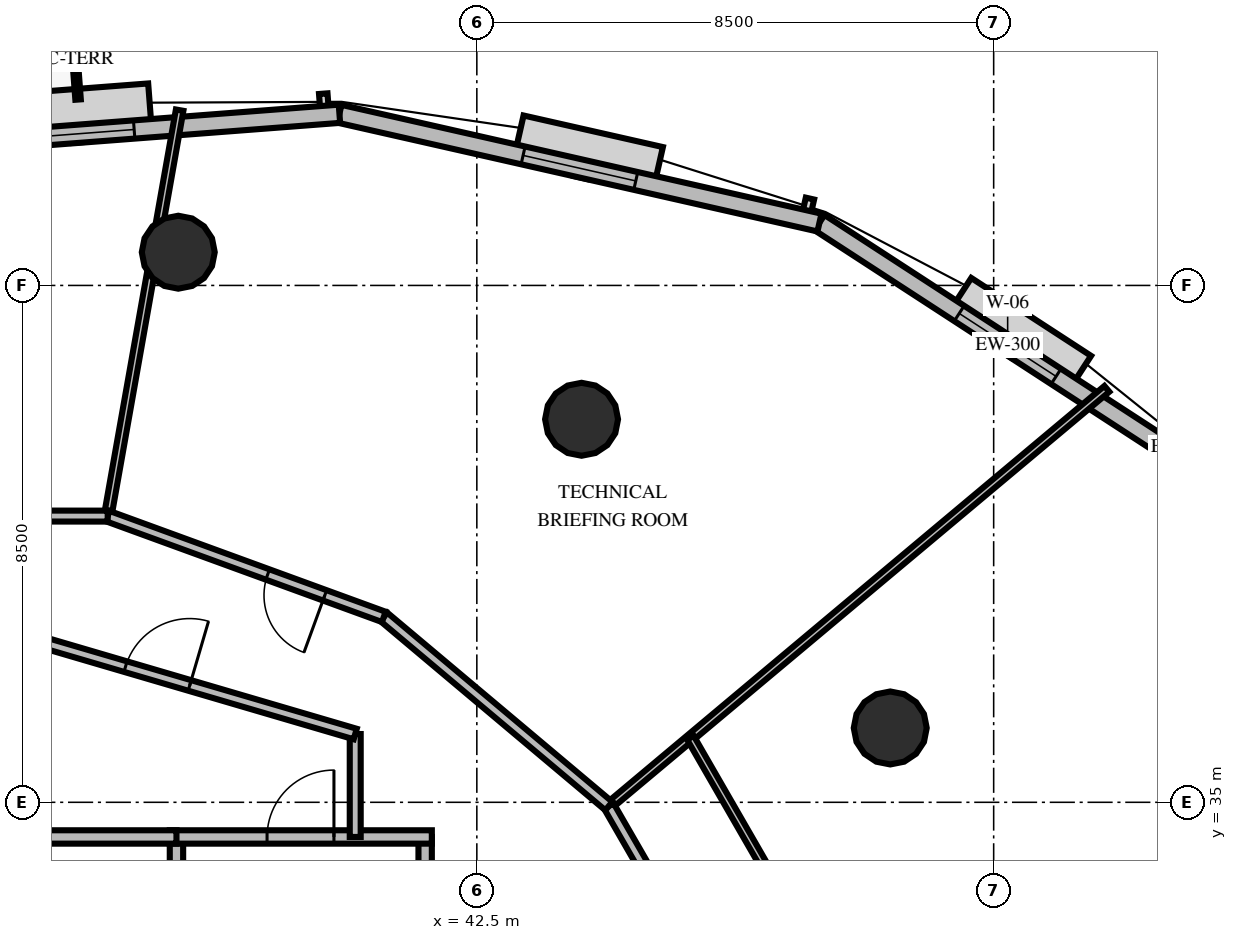
"""IFC4 building model, lengths in metres.
Left out: names, types, materials, properties, quantities, classifications, styles, units other than length and angle.
Written with IfcOpenShell. Run it as: python <this file> out.ifc"""

import sys

from ifc_helpers import new_model, si_unit, direction, frame, frame_2d, origin, origin_2d, place, context, subcontext, project, spatial, rectangle, circle, extrude, element, fill, save


model = new_model("IFC4")
c1 = context("Model", 3, precision=1e-05, world=origin(), true_north=direction((0.0, 1.0)))
c2 = subcontext(c1, "Body", "Model", "MODEL_VIEW")
j1 = project(units=[si_unit("LENGTHUNIT", "METRE"), si_unit("PLANEANGLEUNIT", "RADIAN")], contexts=[c1])
p1 = place(None, origin())
s1 = spatial("IfcSite", under=j1, at=p1, CompositionType="ELEMENT")
p2 = place(p1, origin())
s2 = spatial("IfcBuilding", under=s1, at=p2, CompositionType="ELEMENT")
p3 = place(p2, frame((0.0, 0.0, 117.8)))
s3 = spatial("IfcBuildingStorey", under=s2, at=p3, CompositionType="ELEMENT", Elevation=117.8)
for number, where, z_axis, x_axis in (
    (1, (49.299, 36.222, 0.0), (0.0, 0.0, 1.0), (1.0, 0.0, 0.0)),
    (2, (44.222, 41.299, 0.0), (0.0, 0.0, 1.0), (1.0, 0.0, 0.0)),
    (3, (37.59, 44.046, 0.0), (0.0, 0.0, 1.0), (1.0, 0.0, 0.0)),
):
    element("IfcColumn", number, at=place(p3, frame(where, z_axis=z_axis, x_axis=x_axis)), inside=s3, PredefinedType="COLUMN", context=c2, shape_type="SweptSolid", body=[
        extrude(circle(Radius=0.6, at=origin_2d()), origin(), (0.0, 0.0, 1.0), 4.0),
    ])
p4 = place(p3, frame((54.325, 40.509, 0.0), z_axis=(0.0, 0.0, 1.0), x_axis=(-0.838384683286, 0.545079006046, 0.0)))
e4 = element("IfcWall", 4, at=p4, inside=s3, PredefinedType="SOLIDWALL", context=c2, shape_type="SweptSolid", body=[
    extrude(rectangle(XDim=7.383, YDim=0.3, at=frame_2d((3.691, 0.0))), origin(), (0.0, 0.0, 1.0), 2.9),
])
p5 = place(p4, frame((2.742, 0.0, 0.8)))
e5 = element("IfcOpeningElement", 5, at=p5, cuts=e4, PredefinedType="OPENING", context=c2, shape_type="SweptSolid", body=[
    extrude(rectangle(XDim=1.9, YDim=1.95, at=frame_2d((0.95, 0.975))), frame((0.0, 0.16, 0.0), z_axis=(0.0, -1.0, 0.0), x_axis=(1.0, 0.0, 0.0)), (0.0, 0.0, 1.0), 0.32),
])
p6 = place(p3, frame((48.135, 44.534, 0.0), z_axis=(0.0, 0.0, 1.0), x_axis=(-0.975266584043, 0.22103187564, 0.0)))
e6 = element("IfcWall", 6, at=p6, inside=s3, PredefinedType="SOLIDWALL", context=c2, shape_type="SweptSolid", body=[
    extrude(rectangle(XDim=8.095, YDim=0.3, at=frame_2d((4.048, 0.0))), origin(), (0.0, 0.0, 1.0), 2.9),
])
p7 = place(p6, frame((3.098, 0.0, 0.8)))
e7 = element("IfcOpeningElement", 7, at=p7, cuts=e6, PredefinedType="OPENING", context=c2, shape_type="SweptSolid", body=[
    extrude(rectangle(XDim=1.9, YDim=1.95, at=frame_2d((0.95, 0.975))), frame((0.0, 0.16, 0.0), z_axis=(0.0, -1.0, 0.0), x_axis=(1.0, 0.0, 0.0)), (0.0, 0.0, 1.0), 0.32),
])
p8 = place(p3, frame((40.24, 46.323, 0.0), z_axis=(0.0, 0.0, 1.0), x_axis=(-0.997079436501, -0.076371443005, 0.0)))
e8 = element("IfcWall", 8, at=p8, inside=s3, PredefinedType="SOLIDWALL", context=c2, shape_type="SweptSolid", body=[
    extrude(rectangle(XDim=8.673, YDim=0.3, at=frame_2d((4.336, 0.0))), origin(), (0.0, 0.0, 1.0), 2.9),
])
p9 = place(p8, frame((3.386, 0.0, 0.8)))
e9 = element("IfcOpeningElement", 9, at=p9, cuts=e8, PredefinedType="OPENING", context=c2, shape_type="SweptSolid", body=[
    extrude(rectangle(XDim=1.9, YDim=1.95, at=frame_2d((0.95, 0.975))), frame((0.0, 0.16, 0.0), z_axis=(0.0, -1.0, 0.0), x_axis=(1.0, 0.0, 0.0)), (0.0, 0.0, 1.0), 0.32),
])
p10 = place(p3, frame((37.56, 30.05, 0.0), z_axis=(0.0, 0.0, 1.0), x_axis=(0.0, 1.0, 0.0)))
e10 = element("IfcWall", 10, at=p10, inside=s3, PredefinedType="SOLIDWALL", context=c2, shape_type="SweptSolid", body=[
    extrude(rectangle(XDim=4.38, YDim=0.22, at=frame_2d((2.19, 0.0))), origin(), (0.0, 0.0, 1.0), 2.8),
])
p11 = place(p10, frame((0.8, 0.0, 0.0)))
e11 = element("IfcOpeningElement", 11, at=p11, cuts=e10, PredefinedType="OPENING", context=c2, shape_type="SweptSolid", body=[
    extrude(rectangle(XDim=1.05, YDim=2.1, at=frame_2d((0.525, 1.05))), frame((0.0, 0.12, 0.0), z_axis=(0.0, -1.0, 0.0), x_axis=(1.0, 0.0, 0.0)), (0.0, 0.0, 1.0), 0.24),
])
p12 = place(p3, frame((41.65, 30.05, 0.0), z_axis=(0.0, 0.0, 1.0), x_axis=(0.0, 1.0, 0.0)))
e12 = element("IfcWall", 12, at=p12, inside=s3, PredefinedType="SOLIDWALL", context=c2, shape_type="SweptSolid", body=[
    extrude(rectangle(XDim=4.38, YDim=0.22, at=frame_2d((2.19, 0.0))), origin(), (0.0, 0.0, 1.0), 2.8),
])
p13 = place(p3, frame((37.45, 34.43, 0.0), z_axis=(0.0, 0.0, 1.0), x_axis=(1.0, 0.0, 0.0)))
e13 = element("IfcWall", 13, at=p13, inside=s3, PredefinedType="SOLIDWALL", context=c2, shape_type="SweptSolid", body=[
    extrude(rectangle(XDim=4.31, YDim=0.22, at=frame_2d((2.155, 0.0))), origin(), (0.0, 0.0, 1.0), 2.8),
])
p14 = place(p13, frame((1.6, 0.0, 0.0)))
e14 = element("IfcOpeningElement", 14, at=p14, cuts=e13, PredefinedType="OPENING", context=c2, shape_type="SweptSolid", body=[
    extrude(rectangle(XDim=1.1, YDim=2.15, at=frame_2d((0.55, 1.075))), frame((0.0, 0.12, 0.0), z_axis=(0.0, -1.0, 0.0), x_axis=(1.0, 0.0, 0.0)), (0.0, 0.0, 1.0), 0.24),
])
p15 = place(p3, frame((30.44, 34.43, 0.0), z_axis=(0.0, 0.0, 1.0), x_axis=(1.0, 0.0, 0.0)))
e15 = element("IfcWall", 15, at=p15, inside=s3, PredefinedType="SOLIDWALL", context=c2, shape_type="SweptSolid", body=[
    extrude(rectangle(XDim=7.12, YDim=0.22, at=frame_2d((3.56, 0.0))), origin(), (0.0, 0.0, 1.0), 2.8),
])
p16 = place(p15, frame((3.01, 0.0, 0.0)))
e16 = element("IfcOpeningElement", 16, at=p16, cuts=e15, PredefinedType="OPENING", context=c2, shape_type="SweptSolid", body=[
    extrude(rectangle(XDim=1.1, YDim=2.15, at=frame_2d((0.55, 1.075))), frame((0.0, 0.12, 0.0), z_axis=(0.0, -1.0, 0.0), x_axis=(1.0, 0.0, 0.0)), (0.0, 0.0, 1.0), 0.24),
])
p17 = place(p3, frame((40.5, 36.123, 0.0), z_axis=(0.0, 0.0, 1.0), x_axis=(0.0, -1.0, 0.0)))
e17 = element("IfcWall", 17, at=p17, inside=s3, PredefinedType="PARTITIONING", context=c2, shape_type="SweptSolid", body=[
    extrude(rectangle(XDim=1.693, YDim=0.18, at=frame_2d((0.846, 0.0))), origin(), (0.0, 0.0, 1.0), 2.8),
])
p18 = place(p3, frame((34.0, 38.03, 0.0), z_axis=(0.0, 0.0, 1.0), x_axis=(0.959546654541, -0.281549671923, 0.0)))
e18 = element("IfcWall", 18, at=p18, inside=s3, PredefinedType="PARTITIONING", context=c2, shape_type="SweptSolid", body=[
    extrude(rectangle(XDim=6.774, YDim=0.18, at=frame_2d((3.387, 0.0))), origin(), (0.0, 0.0, 1.0), 2.8),
])
p19 = place(p18, frame((2.837, 0.0, 0.0)))
e19 = element("IfcOpeningElement", 19, at=p19, cuts=e18, PredefinedType="OPENING", context=c2, shape_type="SweptSolid", body=[
    extrude(rectangle(XDim=1.1, YDim=2.15, at=frame_2d((0.55, 1.075))), frame((0.0, 0.1, 0.0), z_axis=(0.0, -1.0, 0.0), x_axis=(1.0, 0.0, 0.0)), (0.0, 0.0, 1.0), 0.2),
])
p20 = place(p3, frame((44.671, 34.938, 0.0), z_axis=(0.0, 0.0, 1.0), x_axis=(0.766606207274, 0.642117530496, 0.0)))
e20 = element("IfcWall", 20, at=p20, inside=s3, PredefinedType="PARTITIONING", context=c2, shape_type="SweptSolid", body=[
    extrude(rectangle(XDim=10.684, YDim=0.125, at=frame_2d((5.342, 0.0))), origin(), (0.0, 0.0, 1.0), 2.8),
])
p21 = place(p3, frame((47.085, 30.75, 0.0), z_axis=(0.0, 0.0, 1.0), x_axis=(-0.499257498982, 0.86645366276, 0.0)))
e21 = element("IfcWall", 21, at=p21, inside=s3, PredefinedType="PARTITIONING", context=c2, shape_type="SweptSolid", body=[
    extrude(rectangle(XDim=4.834, YDim=0.18, at=frame_2d((2.417, 0.0))), origin(), (0.0, 0.0, 1.0), 2.8),
])
p22 = place(p21, frame((1.034, 0.0, 0.0)))
e22 = element("IfcOpeningElement", 22, at=p22, cuts=e21, PredefinedType="OPENING", context=c2, shape_type="SweptSolid", body=[
    extrude(rectangle(XDim=1.0, YDim=2.15, at=frame_2d((0.5, 1.075))), frame((0.0, 0.1, 0.0), z_axis=(0.0, -1.0, 0.0), x_axis=(1.0, 0.0, 0.0)), (0.0, 0.0, 1.0), 0.2),
])
p23 = place(p3, frame((48.73, 31.347, 0.0), z_axis=(0.0, 0.0, 1.0), x_axis=(-0.499261521173, 0.866451345129, 0.0)))
e23 = element("IfcWall", 23, at=p23, inside=s3, PredefinedType="PARTITIONING", context=c2, shape_type="SweptSolid", body=[
    extrude(rectangle(XDim=5.442, YDim=0.125, at=frame_2d((2.721, 0.0))), origin(), (0.0, 0.0, 1.0), 2.8),
])
p24 = place(p23, frame((1.213, 0.0, 0.0)))
e24 = element("IfcOpeningElement", 24, at=p24, cuts=e23, PredefinedType="OPENING", context=c2, shape_type="SweptSolid", body=[
    extrude(rectangle(XDim=0.95, YDim=2.15, at=frame_2d((0.475, 1.075))), frame((0.0, 0.073, 0.0), z_axis=(0.0, -1.0, 0.0), x_axis=(1.0, 0.0, 0.0)), (0.0, 0.0, 1.0), 0.145),
])
p25 = place(p3, frame((36.429, 39.706, 0.0), z_axis=(0.0, 0.0, 1.0), x_axis=(0.174498091195, 0.984657512117, 0.0)))
e25 = element("IfcWall", 25, at=p25, inside=s3, PredefinedType="PARTITIONING", context=c2, shape_type="SweptSolid", body=[
    extrude(rectangle(XDim=6.78, YDim=0.125, at=frame_2d((3.39, 0.0))), origin(), (0.0, 0.0, 1.0), 2.8),
])
p26 = place(p3, frame((44.671, 34.938, 0.0), z_axis=(0.0, 0.0, 1.0), x_axis=(-0.765474013993, 0.643466808702, 0.0)))
e26 = element("IfcWall", 26, at=p26, inside=s3, PredefinedType="PARTITIONING", context=c2, shape_type="SweptSolid", body=[
    extrude(rectangle(XDim=4.834, YDim=0.18, at=frame_2d((2.417, 0.0))), origin(), (0.0, 0.0, 1.0), 2.8),
])
p27 = place(p3, frame((40.97, 38.049, 0.0), z_axis=(0.0, 0.0, 1.0), x_axis=(-0.939403536329, 0.342813354368, 0.0)))
e27 = element("IfcWall", 27, at=p27, inside=s3, PredefinedType="PARTITIONING", context=c2, shape_type="SweptSolid", body=[
    extrude(rectangle(XDim=4.834, YDim=0.18, at=frame_2d((2.417, 0.0))), origin(), (0.0, 0.0, 1.0), 2.8),
])
p28 = place(p27, frame((1.034, 0.0, 0.0)))
e28 = element("IfcOpeningElement", 28, at=p28, cuts=e27, PredefinedType="OPENING", context=c2, shape_type="SweptSolid", body=[
    extrude(rectangle(XDim=1.0, YDim=2.15, at=frame_2d((0.5, 1.075))), frame((0.0, 0.1, 0.0), z_axis=(0.0, -1.0, 0.0), x_axis=(1.0, 0.0, 0.0)), (0.0, 0.0, 1.0), 0.2),
])
p29 = place(p3, frame((36.429, 39.706, 0.0), z_axis=(0.0, 0.0, 1.0), x_axis=(-0.999999586861, 0.000908998715, 0.0)))
e29 = element("IfcWall", 29, at=p29, inside=s3, PredefinedType="PARTITIONING", context=c2, shape_type="SweptSolid", body=[
    extrude(rectangle(XDim=4.834, YDim=0.18, at=frame_2d((2.417, 0.0))), origin(), (0.0, 0.0, 1.0), 2.8),
])
p30 = place(p29, frame((1.917, 0.0, 0.0)))
e30 = element("IfcOpeningElement", 30, at=p30, cuts=e29, PredefinedType="OPENING", context=c2, shape_type="SweptSolid", body=[
    extrude(rectangle(XDim=1.0, YDim=2.15, at=frame_2d((0.5, 1.075))), frame((0.0, 0.1, 0.0), z_axis=(0.0, -1.0, 0.0), x_axis=(1.0, 0.0, 0.0)), (0.0, 0.0, 1.0), 0.2),
])
p31 = place(p5, origin())
e31 = element("IfcWindow", 31, at=p31, inside=s3, PartitioningType="SINGLE_PANEL", PredefinedType="WINDOW", context=c2, shape_type="SweptSolid", body=[
    extrude(rectangle(XDim=1.9, YDim=1.95, at=frame_2d((0.95, 0.975))), frame((0.0, 0.03, 0.0), z_axis=(0.0, -1.0, 0.0), x_axis=(1.0, 0.0, 0.0)), (0.0, 0.0, 1.0), 0.06),
])
fill(e5, e31)
p32 = place(p7, origin())
e32 = element("IfcWindow", 32, at=p32, inside=s3, PartitioningType="SINGLE_PANEL", PredefinedType="WINDOW", context=c2, shape_type="SweptSolid", body=[
    extrude(rectangle(XDim=1.9, YDim=1.95, at=frame_2d((0.95, 0.975))), frame((0.0, 0.03, 0.0), z_axis=(0.0, -1.0, 0.0), x_axis=(1.0, 0.0, 0.0)), (0.0, 0.0, 1.0), 0.06),
])
fill(e7, e32)
p33 = place(p9, origin())
e33 = element("IfcWindow", 33, at=p33, inside=s3, PartitioningType="SINGLE_PANEL", PredefinedType="WINDOW", context=c2, shape_type="SweptSolid", body=[
    extrude(rectangle(XDim=1.9, YDim=1.95, at=frame_2d((0.95, 0.975))), frame((0.0, 0.03, 0.0), z_axis=(0.0, -1.0, 0.0), x_axis=(1.0, 0.0, 0.0)), (0.0, 0.0, 1.0), 0.06),
])
fill(e9, e33)
p34 = place(p14, origin())
e34 = element("IfcDoor", 34, at=p34, inside=s3, OperationType="SINGLE_SWING_RIGHT", PredefinedType="DOOR", context=c2, shape_type="SweptSolid", body=[
    extrude(rectangle(XDim=1.1, YDim=2.15, at=frame_2d((0.55, 1.075))), frame((0.0, 0.025, 0.0), z_axis=(0.0, -1.0, 0.0), x_axis=(1.0, 0.0, 0.0)), (0.0, 0.0, 1.0), 0.05),
])
fill(e14, e34)
p35 = place(p19, origin())
e35 = element("IfcDoor", 35, at=p35, inside=s3, OperationType="SINGLE_SWING_RIGHT", PredefinedType="DOOR", context=c2, shape_type="SweptSolid", body=[
    extrude(rectangle(XDim=1.1, YDim=2.15, at=frame_2d((0.55, 1.075))), frame((0.0, 0.025, 0.0), z_axis=(0.0, -1.0, 0.0), x_axis=(1.0, 0.0, 0.0)), (0.0, 0.0, 1.0), 0.05),
])
fill(e19, e35)
p36 = place(p28, origin())
e36 = element("IfcDoor", 36, at=p36, inside=s3, OperationType="SINGLE_SWING_LEFT", PredefinedType="DOOR", context=c2, shape_type="SweptSolid", body=[
    extrude(rectangle(XDim=1.0, YDim=2.15, at=frame_2d((0.5, 1.075))), frame((0.0, 0.025, 0.0), z_axis=(0.0, -1.0, 0.0), x_axis=(1.0, 0.0, 0.0)), (0.0, 0.0, 1.0), 0.05),
])
fill(e28, e36)
save(model, sys.argv[1])
